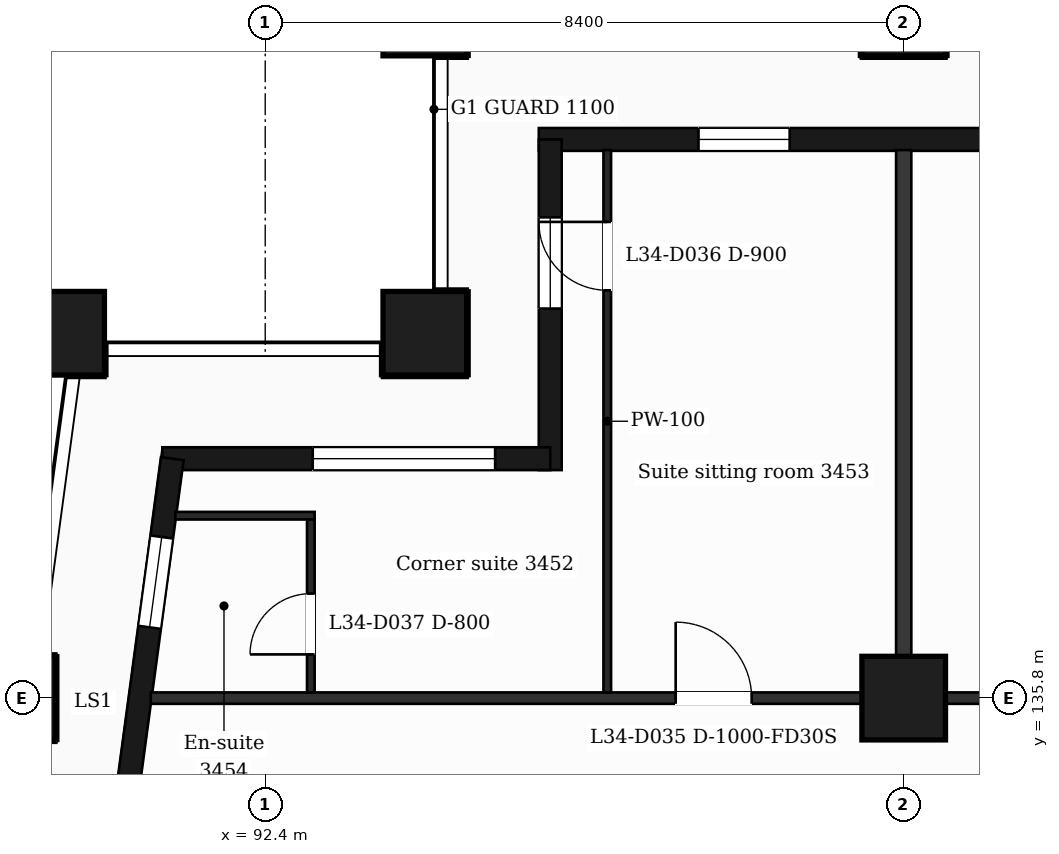
"""IFC4 building model, lengths in metres.
Left out: names, types, materials, properties, quantities, classifications, styles, units other than length and angle.
Written with IfcOpenShell. Run it as: python <this file> out.ifc"""

import sys

from ifc_helpers import new_model, si_unit, direction, frame, frame_2d, origin, origin_2d, place, context, subcontext, project, spatial, rectangle, extrude, element, fill, save


model = new_model("IFC4")
c1 = context("Model", 3, precision=1e-05, world=origin(), true_north=direction((0.0, 1.0)))
c2 = subcontext(c1, "Body", "Model", "MODEL_VIEW")
j1 = project(units=[si_unit("LENGTHUNIT", "METRE"), si_unit("PLANEANGLEUNIT", "RADIAN")], contexts=[c1])
p1 = place(None, origin())
s1 = spatial("IfcSite", under=j1, at=p1, CompositionType="ELEMENT")
p2 = place(p1, origin())
s2 = spatial("IfcBuilding", under=s1, at=p2, CompositionType="ELEMENT")
p3 = place(p2, frame((0.0, 0.0, 147.8)))
s3 = spatial("IfcBuildingStorey", under=s2, at=p3, CompositionType="ELEMENT", Elevation=147.8)
for number, where, z_axis, x_axis in (
    (1, (94.5, 140.6, 0.0), (0.0, 0.0, 1.0), (1.0, 0.0, 0.0)),
    (2, (89.735, 140.6, 0.0), (0.0, 0.0, 1.0), (1.0, 0.0, 0.0)),
    (3, (100.8, 135.8, 0.0), (0.0, 0.0, 1.0), (1.0, 0.0, 0.0)),
    (4, (89.088, 135.8, 0.0), (0.0, 0.0, 1.0), (1.0, 0.0, 0.0)),
    (5, (100.8, 144.8, 0.0), (0.0, 0.0, 1.0), (1.0, 0.0, 0.0)),
    (6, (94.5, 144.8, 0.0), (0.0, 0.0, 1.0), (1.0, 0.0, 0.0)),
):
    element("IfcColumn", number, at=place(p3, frame(where, z_axis=z_axis, x_axis=x_axis)), inside=s3, PredefinedType="COLUMN", context=c2, shape_type="SweptSolid", body=[
        extrude(rectangle(XDim=1.1, YDim=1.1, at=origin_2d()), origin(), (0.0, 0.0, 1.0), 3.7),
    ])
p4 = place(p3, frame((110.4, 143.15, 0.0), z_axis=(0.0, 0.0, 1.0), x_axis=(-1.0, 0.0, 0.0)))
e7 = element("IfcWall", 7, at=p4, inside=s3, PredefinedType="SOLIDWALL", context=c2, shape_type="SweptSolid", body=[
    extrude(rectangle(XDim=14.4, YDim=0.3, at=frame_2d((7.2, 0.0))), origin(), (0.0, 0.0, 1.0), 3.38),
])
p5 = place(p4, frame((2.1, 0.0, 0.9)))
e8 = element("IfcOpeningElement", 8, at=p5, cuts=e7, PredefinedType="OPENING", context=c2, shape_type="SweptSolid", body=[
    extrude(rectangle(XDim=2.4, YDim=2.1, at=frame_2d((1.2, 1.05))), frame((0.0, 0.16, 0.0), z_axis=(0.0, -1.0, 0.0), x_axis=(1.0, 0.0, 0.0)), (0.0, 0.0, 1.0), 0.32),
])
p6 = place(p4, frame((6.9, 0.0, 0.0)))
e9 = element("IfcOpeningElement", 9, at=p6, cuts=e7, PredefinedType="OPENING", context=c2, shape_type="SweptSolid", body=[
    extrude(rectangle(XDim=1.2, YDim=2.4, at=frame_2d((0.6, 1.2))), frame((0.0, 0.16, 0.0), z_axis=(0.0, -1.0, 0.0), x_axis=(1.0, 0.0, 0.0)), (0.0, 0.0, 1.0), 0.32),
])
p7 = place(p4, frame((11.1, 0.0, 0.9)))
e10 = element("IfcOpeningElement", 10, at=p7, cuts=e7, PredefinedType="OPENING", context=c2, shape_type="SweptSolid", body=[
    extrude(rectangle(XDim=1.2, YDim=2.1, at=frame_2d((0.6, 1.05))), frame((0.0, 0.16, 0.0), z_axis=(0.0, -1.0, 0.0), x_axis=(1.0, 0.0, 0.0)), (0.0, 0.0, 1.0), 0.32),
])
p8 = place(p3, frame((96.15, 143.15, 0.0), z_axis=(0.0, 0.0, 1.0), x_axis=(0.0, -1.0, 0.0)))
e11 = element("IfcWall", 11, at=p8, inside=s3, PredefinedType="SOLIDWALL", context=c2, shape_type="SweptSolid", body=[
    extrude(rectangle(XDim=4.35, YDim=0.3, at=frame_2d((2.175, 0.0))), origin(), (0.0, 0.0, 1.0), 3.38),
])
p9 = place(p8, frame((1.025, 0.0, 0.9)))
e12 = element("IfcOpeningElement", 12, at=p9, cuts=e11, PredefinedType="OPENING", context=c2, shape_type="SweptSolid", body=[
    extrude(rectangle(XDim=1.2, YDim=2.1, at=frame_2d((0.6, 1.05))), frame((0.0, 0.16, 0.0), z_axis=(0.0, -1.0, 0.0), x_axis=(1.0, 0.0, 0.0)), (0.0, 0.0, 1.0), 0.32),
])
p10 = place(p3, frame((96.15, 138.95, 0.0), z_axis=(0.0, 0.0, 1.0), x_axis=(-1.0, 0.0, 0.0)))
e13 = element("IfcWall", 13, at=p10, inside=s3, PredefinedType="SOLIDWALL", context=c2, shape_type="SweptSolid", body=[
    extrude(rectangle(XDim=5.104, YDim=0.3, at=frame_2d((2.552, 0.0))), origin(), (0.0, 0.0, 1.0), 3.38),
])
p11 = place(p10, frame((0.725, 0.0, 0.9)))
e14 = element("IfcOpeningElement", 14, at=p11, cuts=e13, PredefinedType="OPENING", context=c2, shape_type="SweptSolid", body=[
    extrude(rectangle(XDim=2.4, YDim=2.1, at=frame_2d((1.2, 1.05))), frame((0.0, 0.16, 0.0), z_axis=(0.0, -1.0, 0.0), x_axis=(1.0, 0.0, 0.0)), (0.0, 0.0, 1.0), 0.32),
])
p12 = place(p3, frame((91.177, 138.95, 0.0), z_axis=(0.0, 0.0, 1.0), x_axis=(-0.133426664613, -0.991058689065, 0.0)))
e15 = element("IfcWall", 15, at=p12, inside=s3, PredefinedType="SOLIDWALL", context=c2, shape_type="SweptSolid", body=[
    extrude(rectangle(XDim=6.609, YDim=0.3, at=frame_2d((3.305, 0.0))), origin(), (0.0, 0.0, 1.0), 3.38),
])
p13 = place(p12, frame((1.039, 0.0, 0.9)))
e16 = element("IfcOpeningElement", 16, at=p13, cuts=e15, PredefinedType="OPENING", context=c2, shape_type="SweptSolid", body=[
    extrude(rectangle(XDim=1.2, YDim=2.1, at=frame_2d((0.6, 1.05))), frame((0.0, 0.16, 0.0), z_axis=(0.0, -1.0, 0.0), x_axis=(1.0, 0.0, 0.0)), (0.0, 0.0, 1.0), 0.32),
])
p14 = place(p12, frame((4.294, 0.0, 0.0)))
e17 = element("IfcOpeningElement", 17, at=p14, cuts=e15, PredefinedType="OPENING", context=c2, shape_type="SweptSolid", body=[
    extrude(rectangle(XDim=1.2, YDim=2.4, at=frame_2d((0.6, 1.2))), frame((0.0, 0.16, 0.0), z_axis=(0.0, -1.0, 0.0), x_axis=(1.0, 0.0, 0.0)), (0.0, 0.0, 1.0), 0.32),
])
p15 = place(p3, frame((90.895, 135.8, 0.0), z_axis=(0.0, 0.0, 1.0), x_axis=(1.0, 0.0, 0.0)))
e18 = element("IfcWall", 18, at=p15, inside=s3, PredefinedType="PARTITIONING", context=c2, shape_type="SweptSolid", body=[
    extrude(rectangle(XDim=45.011, YDim=0.15, at=frame_2d((22.505, 0.0))), origin(), (0.0, 0.0, 1.0), 3.38),
])
p16 = place(p15, frame((6.906, 0.0, 0.0)))
e19 = element("IfcOpeningElement", 19, at=p16, cuts=e18, PredefinedType="OPENING", context=c2, shape_type="SweptSolid", body=[
    extrude(rectangle(XDim=1.0, YDim=2.1, at=frame_2d((0.5, 1.05))), frame((0.0, 0.085, 0.0), z_axis=(0.0, -1.0, 0.0), x_axis=(1.0, 0.0, 0.0)), (0.0, 0.0, 1.0), 0.17),
])
p17 = place(p15, frame((12.935, 0.0, 0.0)))
e20 = element("IfcOpeningElement", 20, at=p17, cuts=e18, PredefinedType="OPENING", context=c2, shape_type="SweptSolid", body=[
    extrude(rectangle(XDim=1.0, YDim=2.1, at=frame_2d((0.5, 1.05))), frame((0.0, 0.085, 0.0), z_axis=(0.0, -1.0, 0.0), x_axis=(1.0, 0.0, 0.0)), (0.0, 0.0, 1.0), 0.17),
])
p18 = place(p15, frame((27.477, 0.0, 0.0)))
e21 = element("IfcOpeningElement", 21, at=p18, cuts=e18, PredefinedType="OPENING", context=c2, shape_type="SweptSolid", body=[
    extrude(rectangle(XDim=0.95, YDim=2.1, at=frame_2d((0.475, 1.05))), frame((0.0, 0.085, 0.0), z_axis=(0.0, -1.0, 0.0), x_axis=(1.0, 0.0, 0.0)), (0.0, 0.0, 1.0), 0.17),
])
p19 = place(p15, frame((31.555, 0.0, 0.0)))
e22 = element("IfcOpeningElement", 22, at=p19, cuts=e18, PredefinedType="OPENING", context=c2, shape_type="SweptSolid", body=[
    extrude(rectangle(XDim=0.95, YDim=2.1, at=frame_2d((0.475, 1.05))), frame((0.0, 0.085, 0.0), z_axis=(0.0, -1.0, 0.0), x_axis=(1.0, 0.0, 0.0)), (0.0, 0.0, 1.0), 0.17),
])
p20 = place(p15, frame((39.814, 0.0, 0.0)))
e23 = element("IfcOpeningElement", 23, at=p20, cuts=e18, PredefinedType="OPENING", context=c2, shape_type="SweptSolid", body=[
    extrude(rectangle(XDim=0.95, YDim=2.1, at=frame_2d((0.475, 1.05))), frame((0.0, 0.085, 0.0), z_axis=(0.0, -1.0, 0.0), x_axis=(1.0, 0.0, 0.0)), (0.0, 0.0, 1.0), 0.17),
])
p21 = place(p3, frame((91.218, 138.2, 0.0), z_axis=(0.0, 0.0, 1.0), x_axis=(1.0, 0.0, 0.0)))
e24 = element("IfcWall", 24, at=p21, inside=s3, PredefinedType="PARTITIONING", context=c2, shape_type="SweptSolid", body=[
    extrude(rectangle(XDim=1.832, YDim=0.1, at=frame_2d((0.916, 0.0))), origin(), (0.0, 0.0, 1.0), 3.38),
])
p22 = place(p3, frame((93.0, 135.875, 0.0), z_axis=(0.0, 0.0, 1.0), x_axis=(0.0, 1.0, 0.0)))
e25 = element("IfcWall", 25, at=p22, inside=s3, PredefinedType="PARTITIONING", context=c2, shape_type="SweptSolid", body=[
    extrude(rectangle(XDim=2.275, YDim=0.1, at=frame_2d((1.137, 0.0))), origin(), (0.0, 0.0, 1.0), 3.38),
])
p23 = place(p22, frame((0.5, 0.0, 0.0)))
e26 = element("IfcOpeningElement", 26, at=p23, cuts=e25, PredefinedType="OPENING", context=c2, shape_type="SweptSolid", body=[
    extrude(rectangle(XDim=0.8, YDim=2.1, at=frame_2d((0.4, 1.05))), frame((0.0, 0.06, 0.0), z_axis=(0.0, -1.0, 0.0), x_axis=(1.0, 0.0, 0.0)), (0.0, 0.0, 1.0), 0.12),
])
p24 = place(p3, frame((96.9, 135.875, 0.0), z_axis=(0.0, 0.0, 1.0), x_axis=(0.0, 1.0, 0.0)))
e27 = element("IfcWall", 27, at=p24, inside=s3, PredefinedType="PARTITIONING", context=c2, shape_type="SweptSolid", body=[
    extrude(rectangle(XDim=7.135, YDim=0.1, at=frame_2d((3.567, 0.0))), origin(), (0.0, 0.0, 1.0), 3.38),
])
p25 = place(p24, frame((5.29, 0.0, 0.0)))
e28 = element("IfcOpeningElement", 28, at=p25, cuts=e27, PredefinedType="OPENING", context=c2, shape_type="SweptSolid", body=[
    extrude(rectangle(XDim=0.9, YDim=2.1, at=frame_2d((0.45, 1.05))), frame((0.0, 0.06, 0.0), z_axis=(0.0, -1.0, 0.0), x_axis=(1.0, 0.0, 0.0)), (0.0, 0.0, 1.0), 0.12),
])
p26 = place(p3, frame((100.8, 135.875, 0.0), z_axis=(0.0, 0.0, 1.0), x_axis=(0.0, 1.0, 0.0)))
e29 = element("IfcWall", 29, at=p26, inside=s3, PredefinedType="PARTITIONING", context=c2, shape_type="SweptSolid", body=[
    extrude(rectangle(XDim=7.135, YDim=0.2, at=frame_2d((3.567, 0.0))), origin(), (0.0, 0.0, 1.0), 3.38),
])
p27 = place(p7, origin())
e30 = element("IfcWindow", 30, at=p27, inside=s3, PartitioningType="SINGLE_PANEL", PredefinedType="WINDOW", context=c2, shape_type="SweptSolid", body=[
    extrude(rectangle(XDim=1.2, YDim=2.1, at=frame_2d((0.6, 1.05))), frame((0.0, 0.03, 0.0), z_axis=(0.0, -1.0, 0.0), x_axis=(1.0, 0.0, 0.0)), (0.0, 0.0, 1.0), 0.06),
])
fill(e10, e30)
p28 = place(p9, origin())
e31 = element("IfcWindow", 31, at=p28, inside=s3, PartitioningType="SINGLE_PANEL", PredefinedType="WINDOW", context=c2, shape_type="SweptSolid", body=[
    extrude(rectangle(XDim=1.2, YDim=2.1, at=frame_2d((0.6, 1.05))), frame((0.0, 0.03, 0.0), z_axis=(0.0, -1.0, 0.0), x_axis=(1.0, 0.0, 0.0)), (0.0, 0.0, 1.0), 0.06),
])
fill(e12, e31)
p29 = place(p11, origin())
e32 = element("IfcWindow", 32, at=p29, inside=s3, PartitioningType="SINGLE_PANEL", PredefinedType="WINDOW", context=c2, shape_type="SweptSolid", body=[
    extrude(rectangle(XDim=2.4, YDim=2.1, at=frame_2d((1.2, 1.05))), frame((0.0, 0.03, 0.0), z_axis=(0.0, -1.0, 0.0), x_axis=(1.0, 0.0, 0.0)), (0.0, 0.0, 1.0), 0.06),
])
fill(e14, e32)
p30 = place(p13, origin())
e33 = element("IfcWindow", 33, at=p30, inside=s3, PartitioningType="SINGLE_PANEL", PredefinedType="WINDOW", context=c2, shape_type="SweptSolid", body=[
    extrude(rectangle(XDim=1.2, YDim=2.1, at=frame_2d((0.6, 1.05))), frame((0.0, 0.03, 0.0), z_axis=(0.0, -1.0, 0.0), x_axis=(1.0, 0.0, 0.0)), (0.0, 0.0, 1.0), 0.06),
])
fill(e16, e33)
p31 = place(p16, origin())
e34 = element("IfcDoor", 34, at=p31, inside=s3, OperationType="SINGLE_SWING_LEFT", PredefinedType="DOOR", context=c2, shape_type="SweptSolid", body=[
    extrude(rectangle(XDim=1.0, YDim=2.1, at=frame_2d((0.5, 1.05))), frame((0.0, 0.025, 0.0), z_axis=(0.0, -1.0, 0.0), x_axis=(1.0, 0.0, 0.0)), (0.0, 0.0, 1.0), 0.05),
])
fill(e19, e34)
p32 = place(p25, origin())
e35 = element("IfcDoor", 35, at=p32, inside=s3, OperationType="SINGLE_SWING_RIGHT", PredefinedType="DOOR", context=c2, shape_type="SweptSolid", body=[
    extrude(rectangle(XDim=0.9, YDim=2.1, at=frame_2d((0.45, 1.05))), frame((0.0, 0.025, 0.0), z_axis=(0.0, -1.0, 0.0), x_axis=(1.0, 0.0, 0.0)), (0.0, 0.0, 1.0), 0.05),
])
fill(e28, e35)
p33 = place(p23, origin())
e36 = element("IfcDoor", 36, at=p33, inside=s3, OperationType="SINGLE_SWING_LEFT", PredefinedType="DOOR", context=c2, shape_type="SweptSolid", body=[
    extrude(rectangle(XDim=0.8, YDim=2.1, at=frame_2d((0.4, 1.05))), frame((0.0, 0.025, 0.0), z_axis=(0.0, -1.0, 0.0), x_axis=(1.0, 0.0, 0.0)), (0.0, 0.0, 1.0), 0.05),
])
fill(e26, e36)
save(model, sys.argv[1])
